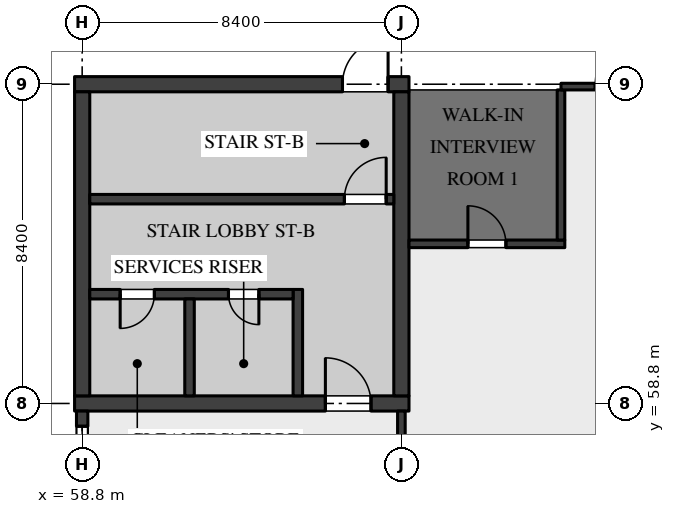
"""IFC4 building model, lengths in metres.
Left out: names, types, materials, properties, quantities, classifications, styles, units other than length and angle.
Written with IfcOpenShell. Run it as: python <this file> out.ifc"""

import sys

from ifc_helpers import new_model, si_unit, direction, frame, frame_2d, origin, place, context, subcontext, project, spatial, rectangle, extrude, element, fill, save


model = new_model("IFC4")
c1 = context("Model", 3, precision=1e-05, world=origin(), true_north=direction((0.0, 1.0)))
c2 = subcontext(c1, "Body", "Model", "MODEL_VIEW")
j1 = project(units=[si_unit("LENGTHUNIT", "METRE"), si_unit("PLANEANGLEUNIT", "RADIAN")], contexts=[c1])
p1 = place(None, origin())
s1 = spatial("IfcSite", under=j1, at=p1, CompositionType="ELEMENT")
p2 = place(p1, origin())
s2 = spatial("IfcBuilding", under=s1, at=p2, CompositionType="ELEMENT")
p3 = place(p2, origin())
s3 = spatial("IfcBuildingStorey", under=s2, at=p3, CompositionType="ELEMENT", Elevation=0.0)
p4 = place(p3, frame((58.6, 58.8, 0.0), z_axis=(0.0, 0.0, 1.0), x_axis=(1.0, 0.0, 0.0)))
e1 = element("IfcWall", 1, at=p4, inside=s3, PredefinedType="SHEAR", context=c2, shape_type="SweptSolid", body=[
    extrude(rectangle(XDim=8.8, YDim=0.4, at=frame_2d((4.4, 0.0))), origin(), (0.0, 0.0, 1.0), 5.05),
])
p5 = place(p4, frame((6.6, 0.0, 0.0)))
e2 = element("IfcOpeningElement", 2, at=p5, cuts=e1, PredefinedType="OPENING", context=c2, shape_type="SweptSolid", body=[
    extrude(rectangle(XDim=1.2, YDim=2.1, at=frame_2d((0.6, 1.05))), frame((0.0, 0.21, 0.0), z_axis=(0.0, -1.0, 0.0), x_axis=(1.0, 0.0, 0.0)), (0.0, 0.0, 1.0), 0.42),
])
p6 = place(p3, frame((58.6, 67.2, 0.0), z_axis=(0.0, 0.0, 1.0), x_axis=(1.0, 0.0, 0.0)))
e3 = element("IfcWall", 3, at=p6, inside=s3, PredefinedType="SHEAR", context=c2, shape_type="SweptSolid", body=[
    extrude(rectangle(XDim=8.8, YDim=0.4, at=frame_2d((4.4, 0.0))), origin(), (0.0, 0.0, 1.0), 5.05),
])
p7 = place(p6, frame((7.05, 0.0, 0.0)))
e4 = element("IfcOpeningElement", 4, at=p7, cuts=e3, PredefinedType="OPENING", context=c2, shape_type="SweptSolid", body=[
    extrude(rectangle(XDim=1.2, YDim=2.1, at=frame_2d((0.6, 1.05))), frame((0.0, 0.21, 0.0), z_axis=(0.0, -1.0, 0.0), x_axis=(1.0, 0.0, 0.0)), (0.0, 0.0, 1.0), 0.42),
])
for number, where, z_axis, x_axis in (
    (5, (58.8, 59.0, 0.0), (0.0, 0.0, 1.0), (0.0, 1.0, 0.0)),
    (6, (67.2, 59.0, 0.0), (0.0, 0.0, 1.0), (0.0, 1.0, 0.0)),
):
    element("IfcWall", number, at=place(p3, frame(where, z_axis=z_axis, x_axis=x_axis)), inside=s3, PredefinedType="SHEAR", context=c2, shape_type="SweptSolid", body=[
        extrude(rectangle(XDim=8.0, YDim=0.4, at=frame_2d((4.0, 0.0))), origin(), (0.0, 0.0, 1.0), 5.05),
    ])
p8 = place(p3, frame((67.0, 64.175, 0.0), z_axis=(0.0, 0.0, 1.0), x_axis=(-1.0, 0.0, 0.0)))
e7 = element("IfcWall", 7, at=p8, inside=s3, PredefinedType="SOLIDWALL", context=c2, shape_type="SweptSolid", body=[
    extrude(rectangle(XDim=8.0, YDim=0.25, at=frame_2d((4.0, 0.0))), origin(), (0.0, 0.0, 1.0), 5.05),
])
p9 = place(p8, frame((0.2, 0.0, 0.0)))
e8 = element("IfcOpeningElement", 8, at=p9, cuts=e7, PredefinedType="OPENING", context=c2, shape_type="SweptSolid", body=[
    extrude(rectangle(XDim=1.1, YDim=2.1, at=frame_2d((0.55, 1.05))), frame((0.0, 0.135, 0.0), z_axis=(0.0, -1.0, 0.0), x_axis=(1.0, 0.0, 0.0)), (0.0, 0.0, 1.0), 0.27),
])
p10 = place(p3, frame((64.475, 61.8, 0.0), z_axis=(0.0, 0.0, 1.0), x_axis=(0.0, -1.0, 0.0)))
e9 = element("IfcWall", 9, at=p10, inside=s3, PredefinedType="SOLIDWALL", context=c2, shape_type="SweptSolid", body=[
    extrude(rectangle(XDim=2.8, YDim=0.25, at=frame_2d((1.4, 0.0))), origin(), (0.0, 0.0, 1.0), 5.05),
])
p11 = place(p3, frame((64.35, 61.675, 0.0), z_axis=(0.0, 0.0, 1.0), x_axis=(-1.0, 0.0, 0.0)))
e10 = element("IfcWall", 10, at=p11, inside=s3, PredefinedType="SOLIDWALL", context=c2, shape_type="SweptSolid", body=[
    extrude(rectangle(XDim=5.35, YDim=0.25, at=frame_2d((2.675, 0.0))), origin(), (0.0, 0.0, 1.0), 5.05),
])
p12 = place(p11, frame((3.65, 0.0, 0.0)))
e11 = element("IfcOpeningElement", 11, at=p12, cuts=e10, PredefinedType="OPENING", context=c2, shape_type="SweptSolid", body=[
    extrude(rectangle(XDim=0.9, YDim=2.1, at=frame_2d((0.45, 1.05))), frame((0.0, 0.135, 0.0), z_axis=(0.0, -1.0, 0.0), x_axis=(1.0, 0.0, 0.0)), (0.0, 0.0, 1.0), 0.27),
])
p13 = place(p11, frame((0.9, 0.0, 0.0)))
e12 = element("IfcOpeningElement", 12, at=p13, cuts=e10, PredefinedType="OPENING", context=c2, shape_type="SweptSolid", body=[
    extrude(rectangle(XDim=0.8, YDim=2.1, at=frame_2d((0.4, 1.05))), frame((0.0, 0.135, 0.0), z_axis=(0.0, -1.0, 0.0), x_axis=(1.0, 0.0, 0.0)), (0.0, 0.0, 1.0), 0.27),
])
p14 = place(p3, frame((61.625, 61.55, 0.0), z_axis=(0.0, 0.0, 1.0), x_axis=(0.0, -1.0, 0.0)))
e13 = element("IfcWall", 13, at=p14, inside=s3, PredefinedType="SOLIDWALL", context=c2, shape_type="SweptSolid", body=[
    extrude(rectangle(XDim=2.55, YDim=0.25, at=frame_2d((1.275, 0.0))), origin(), (0.0, 0.0, 1.0), 5.05),
])
p15 = place(p3, frame((67.4, 63.0, 0.0), z_axis=(0.0, 0.0, 1.0), x_axis=(1.0, 0.0, 0.0)))
e14 = element("IfcWall", 14, at=p15, inside=s3, PredefinedType="PARTITIONING", context=c2, shape_type="SweptSolid", body=[
    extrude(rectangle(XDim=4.1, YDim=0.2, at=frame_2d((2.05, 0.0))), origin(), (0.0, 0.0, 1.0), 18.77),
])
p16 = place(p15, frame((1.55, 0.0, 0.0)))
e15 = element("IfcOpeningElement", 15, at=p16, cuts=e14, PredefinedType="OPENING", context=c2, shape_type="SweptSolid", body=[
    extrude(rectangle(XDim=1.0, YDim=2.1, at=frame_2d((0.5, 1.05))), frame((0.0, 0.11, 0.0), z_axis=(0.0, -1.0, 0.0), x_axis=(1.0, 0.0, 0.0)), (0.0, 0.0, 1.0), 0.22),
])
p17 = place(p3, frame((71.4, 63.1, 0.0), z_axis=(0.0, 0.0, 1.0), x_axis=(0.0, 1.0, 0.0)))
e16 = element("IfcWall", 16, at=p17, inside=s3, PredefinedType="PARTITIONING", context=c2, shape_type="SweptSolid", body=[
    extrude(rectangle(XDim=3.95, YDim=0.2, at=frame_2d((1.975, 0.0))), origin(), (0.0, 0.0, 1.0), 18.591),
])
p18 = place(p3, frame((67.2, 54.6, 0.0), z_axis=(0.0, 0.0, 1.0), x_axis=(0.0, 1.0, 0.0)))
e17 = element("IfcWall", 17, at=p18, inside=s3, PredefinedType="PARTITIONING", context=c2, shape_type="SweptSolid", body=[
    extrude(rectangle(XDim=4.0, YDim=0.2, at=frame_2d((2.0, 0.0))), origin(), (0.0, 0.0, 1.0), 18.77),
])
p19 = place(p18, frame((1.5, 0.0, 0.0)))
e18 = element("IfcOpeningElement", 18, at=p19, cuts=e17, PredefinedType="OPENING", context=c2, shape_type="SweptSolid", body=[
    extrude(rectangle(XDim=1.0, YDim=2.4, at=frame_2d((0.5, 1.2))), frame((0.0, 0.11, 0.0), z_axis=(0.0, -1.0, 0.0), x_axis=(1.0, 0.0, 0.0)), (0.0, 0.0, 1.0), 0.22),
])
p20 = place(p3, frame((75.27, 67.137, 0.0), z_axis=(0.0, 0.0, 1.0), x_axis=(-1.0, 0.0, 0.0)))
e19 = element("IfcWall", 19, at=p20, inside=s3, PredefinedType="SOLIDWALL", context=c2, shape_type="SweptSolid", body=[
    extrude(rectangle(XDim=3.87, YDim=0.175, at=frame_2d((1.935, 0.0))), origin(), (0.0, 0.0, 1.0), 5.4),
])
p21 = place(p20, frame((0.57, 0.0, 0.0)))
e20 = element("IfcOpeningElement", 20, at=p21, cuts=e19, PredefinedType="OPENING", context=c2, shape_type="SweptSolid", body=[
    extrude(rectangle(XDim=2.4, YDim=2.7, at=frame_2d((1.2, 1.35))), frame((0.0, 0.098, 0.0), z_axis=(0.0, -1.0, 0.0), x_axis=(1.0, 0.0, 0.0)), (0.0, 0.0, 1.0), 0.195),
])
p22 = place(p3, frame((58.8, 58.6, 0.0), z_axis=(0.0, 0.0, 1.0), x_axis=(0.0, -1.0, 0.0)))
e21 = element("IfcWall", 21, at=p22, inside=s3, PredefinedType="SOLIDWALL", context=c2, shape_type="SweptSolid", body=[
    extrude(rectangle(XDim=7.87, YDim=0.3, at=frame_2d((3.935, 0.0))), origin(), (0.0, 0.0, 1.0), 5.05),
])
p23 = place(p22, frame((0.4, 0.0, 2.85)))
e22 = element("IfcOpeningElement", 22, at=p23, cuts=e21, PredefinedType="OPENING", context=c2, shape_type="SweptSolid", body=[
    extrude(rectangle(XDim=3.0, YDim=1.2, at=frame_2d((1.5, 0.6))), frame((0.0, 0.16, 0.0), z_axis=(0.0, -1.0, 0.0), x_axis=(1.0, 0.0, 0.0)), (0.0, 0.0, 1.0), 0.32),
])
p24 = place(p22, frame((4.9, 0.0, 2.25)))
e23 = element("IfcOpeningElement", 23, at=p24, cuts=e21, PredefinedType="OPENING", context=c2, shape_type="SweptSolid", body=[
    extrude(rectangle(XDim=2.4, YDim=1.8, at=frame_2d((1.2, 0.9))), frame((0.0, 0.16, 0.0), z_axis=(0.0, -1.0, 0.0), x_axis=(1.0, 0.0, 0.0)), (0.0, 0.0, 1.0), 0.32),
])
p25 = place(p12, origin())
e24 = element("IfcDoor", 24, at=p25, inside=s3, OperationType="SINGLE_SWING_LEFT", PredefinedType="DOOR", context=c2, shape_type="SweptSolid", body=[
    extrude(rectangle(XDim=0.9, YDim=2.1, at=frame_2d((0.45, 1.05))), frame((0.0, 0.035, 0.0), z_axis=(0.0, -1.0, 0.0), x_axis=(1.0, 0.0, 0.0)), (0.0, 0.0, 1.0), 0.07),
])
fill(e11, e24)
p26 = place(p5, origin())
e25 = element("IfcDoor", 25, at=p26, inside=s3, OperationType="SINGLE_SWING_RIGHT", PredefinedType="DOOR", context=c2, shape_type="SweptSolid", body=[
    extrude(rectangle(XDim=1.2, YDim=2.1, at=frame_2d((0.6, 1.05))), frame((0.0, 0.035, 0.0), z_axis=(0.0, -1.0, 0.0), x_axis=(1.0, 0.0, 0.0)), (0.0, 0.0, 1.0), 0.07),
])
fill(e2, e25)
p27 = place(p13, origin())
e26 = element("IfcDoor", 26, at=p27, inside=s3, OperationType="SINGLE_SWING_RIGHT", PredefinedType="DOOR", context=c2, shape_type="SweptSolid", body=[
    extrude(rectangle(XDim=0.8, YDim=2.1, at=frame_2d((0.4, 1.05))), frame((0.0, 0.035, 0.0), z_axis=(0.0, -1.0, 0.0), x_axis=(1.0, 0.0, 0.0)), (0.0, 0.0, 1.0), 0.07),
])
fill(e12, e26)
p28 = place(p9, frame((1.1, 0.0, 0.0), z_axis=(0.0, 0.0, 1.0), x_axis=(-1.0, 0.0, 0.0)))
e27 = element("IfcDoor", 27, at=p28, inside=s3, OperationType="SINGLE_SWING_LEFT", PredefinedType="DOOR", context=c2, shape_type="SweptSolid", body=[
    extrude(rectangle(XDim=1.1, YDim=2.1, at=frame_2d((0.55, 1.05))), frame((0.0, 0.035, 0.0), z_axis=(0.0, -1.0, 0.0), x_axis=(1.0, 0.0, 0.0)), (0.0, 0.0, 1.0), 0.07),
])
fill(e8, e27)
p29 = place(p7, origin())
e28 = element("IfcDoor", 28, at=p29, inside=s3, OperationType="SINGLE_SWING_LEFT", PredefinedType="DOOR", context=c2, shape_type="SweptSolid", body=[
    extrude(rectangle(XDim=1.2, YDim=2.1, at=frame_2d((0.6, 1.05))), frame((0.0, 0.035, 0.0), z_axis=(0.0, -1.0, 0.0), x_axis=(1.0, 0.0, 0.0)), (0.0, 0.0, 1.0), 0.07),
])
fill(e4, e28)
p30 = place(p16, origin())
e29 = element("IfcDoor", 29, at=p30, inside=s3, OperationType="SINGLE_SWING_RIGHT", PredefinedType="DOOR", context=c2, shape_type="SweptSolid", body=[
    extrude(rectangle(XDim=1.0, YDim=2.1, at=frame_2d((0.5, 1.05))), frame((0.0, 0.045, 0.0), z_axis=(0.0, -1.0, 0.0), x_axis=(1.0, 0.0, 0.0)), (0.0, 0.0, 1.0), 0.09),
])
fill(e15, e29)
p31 = place(p23, origin())
e30 = element("IfcWindow", 30, at=p31, inside=s3, PartitioningType="SINGLE_PANEL", PredefinedType="WINDOW", context=c2, shape_type="SweptSolid", body=[
    extrude(rectangle(XDim=3.0, YDim=1.2, at=frame_2d((1.5, 0.6))), frame((0.0, 0.05, 0.0), z_axis=(0.0, -1.0, 0.0), x_axis=(1.0, 0.0, 0.0)), (0.0, 0.0, 1.0), 0.1),
])
fill(e22, e30)
save(model, sys.argv[1])
